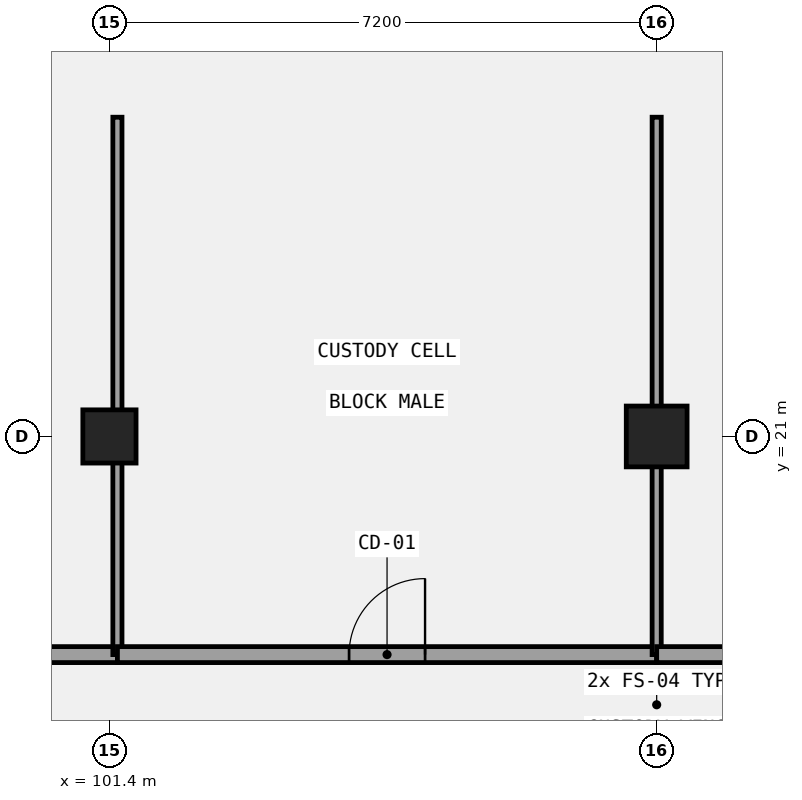
"""IFC4 building model, lengths in metres.
Left out: names, types, materials, properties, quantities, classifications, styles, units other than length and angle.
Written with IfcOpenShell. Run it as: python <this file> out.ifc"""

import sys

from ifc_helpers import new_model, si_unit, direction, frame, frame_2d, origin, origin_2d, place, context, subcontext, project, spatial, rectangle, extrude, element, fill, save


model = new_model("IFC4")
c1 = context("Model", 3, precision=1e-05, world=origin(), true_north=direction((0.0, 1.0)))
c2 = subcontext(c1, "Body", "Model", "MODEL_VIEW")
j1 = project(units=[si_unit("LENGTHUNIT", "METRE"), si_unit("PLANEANGLEUNIT", "RADIAN")], contexts=[c1])
p1 = place(None, origin())
s1 = spatial("IfcSite", under=j1, at=p1, CompositionType="ELEMENT")
p2 = place(p1, origin())
s2 = spatial("IfcBuilding", under=s1, at=p2, CompositionType="ELEMENT")
p3 = place(p2, frame((0.0, 0.0, 5.4)))
s3 = spatial("IfcBuildingStorey", under=s2, at=p3, CompositionType="ELEMENT", Elevation=5.4)
p4 = place(p3, frame((101.4, 21.0, 0.0), z_axis=(0.0, 0.0, 1.0), x_axis=(1.0, 0.0, 0.0)))
e1 = element("IfcColumn", 1, at=p4, inside=s3, PredefinedType="COLUMN", context=c2, shape_type="SweptSolid", body=[
    extrude(rectangle(XDim=0.7, YDim=0.7, at=origin_2d()), origin(), (0.0, 0.0, 1.0), 4.2),
])
p5 = place(p3, frame((108.6, 21.0, 0.0), z_axis=(0.0, 0.0, 1.0), x_axis=(1.0, 0.0, 0.0)))
e2 = element("IfcColumn", 2, at=p5, inside=s3, PredefinedType="COLUMN", context=c2, shape_type="SweptSolid", body=[
    extrude(rectangle(XDim=0.8, YDim=0.8, at=origin_2d()), origin(), (0.0, 0.0, 1.0), 4.2),
])
p6 = place(p3, frame((94.41, 18.13, 0.0), z_axis=(0.0, 0.0, 1.0), x_axis=(1.0, 0.0, 0.0)))
e3 = element("IfcWall", 3, at=p6, inside=s3, PredefinedType="PARTITIONING", context=c2, shape_type="SweptSolid", body=[
    extrude(rectangle(XDim=7.095, YDim=0.21, at=frame_2d((3.547, 0.0))), origin(), (0.0, 0.0, 1.0), 3.92),
])
p7 = place(p6, frame((2.998, 0.0, 0.0)))
e4 = element("IfcOpeningElement", 4, at=p7, cuts=e3, PredefinedType="OPENING", context=c2, shape_type="SweptSolid", body=[
    extrude(rectangle(XDim=1.1, YDim=2.35, at=frame_2d((0.55, 1.175))), frame((0.0, 0.115, 0.0), z_axis=(0.0, -1.0, 0.0), x_axis=(1.0, 0.0, 0.0)), (0.0, 0.0, 1.0), 0.23),
])
p8 = place(p3, frame((101.505, 18.13, 0.0), z_axis=(0.0, 0.0, 1.0), x_axis=(0.0, 1.0, 0.0)))
e5 = element("IfcWall", 5, at=p8, inside=s3, PredefinedType="PARTITIONING", context=c2, shape_type="SweptSolid", body=[
    extrude(rectangle(XDim=7.07, YDim=0.12, at=frame_2d((3.535, 0.0))), origin(), (0.0, 0.0, 1.0), 3.12),
])
p9 = place(p3, frame((101.505, 18.13, 0.0), z_axis=(0.0, 0.0, 1.0), x_axis=(1.0, 0.0, 0.0)))
e6 = element("IfcWall", 6, at=p9, inside=s3, PredefinedType="PARTITIONING", context=c2, shape_type="SweptSolid", body=[
    extrude(rectangle(XDim=7.095, YDim=0.21, at=frame_2d((3.548, 0.0))), origin(), (0.0, 0.0, 1.0), 3.92),
])
p10 = place(p9, frame((3.048, 0.0, 0.0)))
e7 = element("IfcOpeningElement", 7, at=p10, cuts=e6, PredefinedType="OPENING", context=c2, shape_type="SweptSolid", body=[
    extrude(rectangle(XDim=1.0, YDim=2.15, at=frame_2d((0.5, 1.075))), frame((0.0, 0.115, 0.0), z_axis=(0.0, -1.0, 0.0), x_axis=(1.0, 0.0, 0.0)), (0.0, 0.0, 1.0), 0.23),
])
p11 = place(p3, frame((108.6, 18.13, 0.0), z_axis=(0.0, 0.0, 1.0), x_axis=(0.0, 1.0, 0.0)))
e8 = element("IfcWall", 8, at=p11, inside=s3, PredefinedType="PARTITIONING", context=c2, shape_type="SweptSolid", body=[
    extrude(rectangle(XDim=7.07, YDim=0.12, at=frame_2d((3.535, 0.0))), origin(), (0.0, 0.0, 1.0), 3.07),
])
p12 = place(p3, frame((108.6, 18.13, 0.0), z_axis=(0.0, 0.0, 1.0), x_axis=(1.0, 0.0, 0.0)))
e9 = element("IfcWall", 9, at=p12, inside=s3, PredefinedType="PARTITIONING", context=c2, shape_type="SweptSolid", body=[
    extrude(rectangle(XDim=7.095, YDim=0.21, at=frame_2d((3.547, 0.0))), origin(), (0.0, 0.0, 1.0), 3.92),
])
p13 = place(p12, frame((3.048, 0.0, 0.0)))
e10 = element("IfcOpeningElement", 10, at=p13, cuts=e9, PredefinedType="OPENING", context=c2, shape_type="SweptSolid", body=[
    extrude(rectangle(XDim=1.0, YDim=2.15, at=frame_2d((0.5, 1.075))), frame((0.0, 0.115, 0.0), z_axis=(0.0, -1.0, 0.0), x_axis=(1.0, 0.0, 0.0)), (0.0, 0.0, 1.0), 0.23),
])
p14 = place(p10, origin())
e11 = element("IfcDoor", 11, at=p14, inside=s3, OperationType="SINGLE_SWING_RIGHT", PredefinedType="DOOR", context=c2, shape_type="SweptSolid", body=[
    extrude(rectangle(XDim=1.0, YDim=2.15, at=frame_2d((0.5, 1.075))), frame((0.0, 0.025, 0.0), z_axis=(0.0, -1.0, 0.0), x_axis=(1.0, 0.0, 0.0)), (0.0, 0.0, 1.0), 0.05),
])
fill(e7, e11)
save(model, sys.argv[1])
